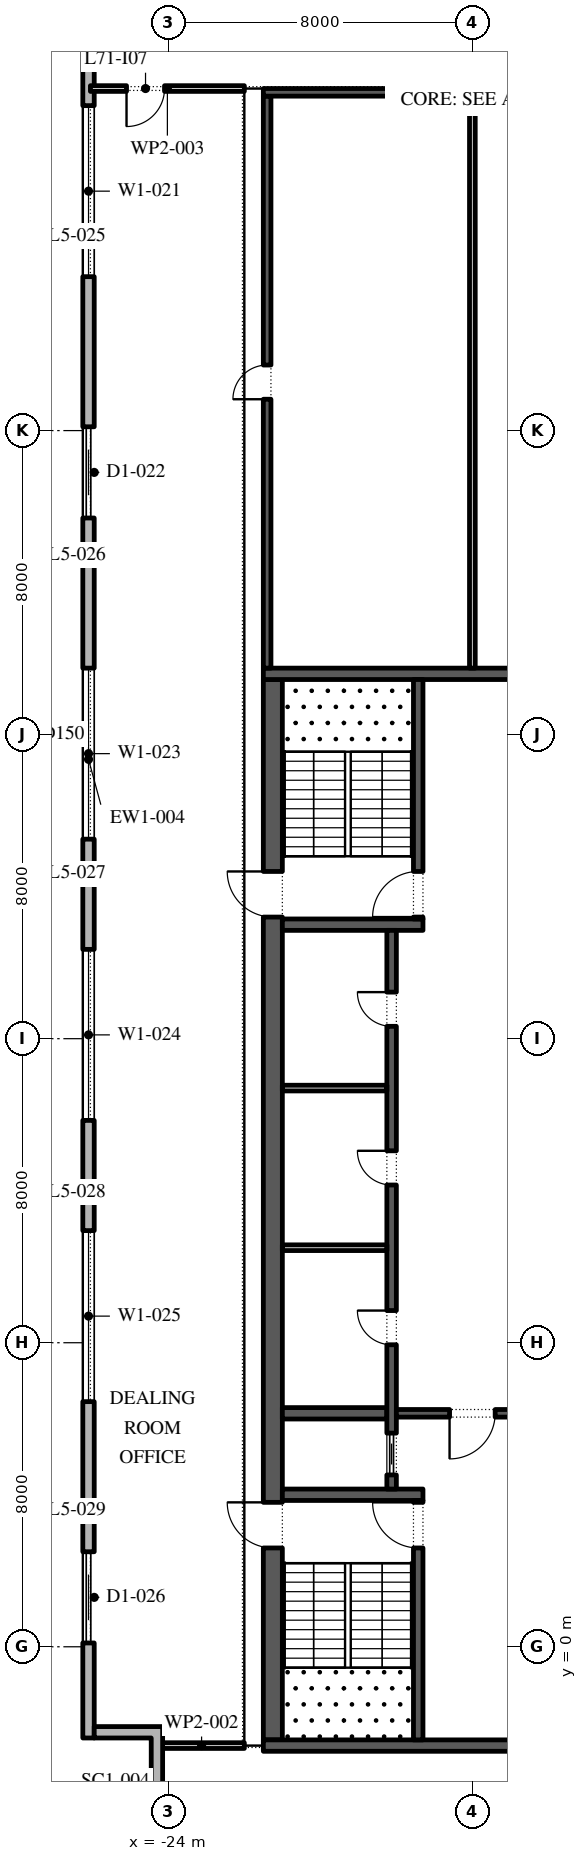
"""IFC4 building model, lengths in metres.
Left out: names, types, materials, properties, quantities, classifications, styles, units other than length and angle.
Written with IfcOpenShell. Run it as: python <this file> out.ifc"""

import sys

from ifc_helpers import new_model, si_unit, direction, frame, frame_2d, origin, place, context, subcontext, project, spatial, polyline, rectangle, outline, extrude, element, fill, save


model = new_model("IFC4")
c1 = context("Model", 3, precision=1e-05, world=origin(), true_north=direction((0.0, 1.0)))
c2 = subcontext(c1, "Body", "Model", "MODEL_VIEW")
j1 = project(units=[si_unit("LENGTHUNIT", "METRE"), si_unit("PLANEANGLEUNIT", "RADIAN")], contexts=[c1])
p1 = place(None, origin())
s1 = spatial("IfcSite", under=j1, at=p1, CompositionType="ELEMENT")
p2 = place(p1, origin())
s2 = spatial("IfcBuilding", under=s1, at=p2, CompositionType="ELEMENT")
p3 = place(p2, frame((0.0, 0.0, 325.8)))
s3 = spatial("IfcBuildingStorey", under=s2, at=p3, CompositionType="ELEMENT", Elevation=325.8)
p4 = place(p3, frame((-26.1, 49.1, 0.0), z_axis=(0.0, 0.0, 1.0), x_axis=(0.0, -1.0, 0.0)))
e1 = element("IfcWall", 1, at=p4, inside=s3, PredefinedType="STANDARD", context=c2, shape_type="SweptSolid", body=[
    extrude(rectangle(XDim=51.5, YDim=0.3, at=frame_2d((25.75, 0.0))), origin(), (0.0, 0.0, 1.0), 4.0),
])
p5 = place(p4, frame((1.3, 0.0, 0.45)))
e2 = element("IfcOpeningElement", 2, at=p5, cuts=e1, PredefinedType="OPENING", context=c2, shape_type="SweptSolid", body=[
    extrude(rectangle(XDim=4.5, YDim=3.05, at=frame_2d((2.25, 1.525))), frame((0.0, 0.16, 0.0), z_axis=(0.0, -1.0, 0.0), x_axis=(1.0, 0.0, 0.0)), (0.0, 0.0, 1.0), 0.32),
])
p6 = place(p4, frame((8.55, 0.0, 0.45)))
e3 = element("IfcOpeningElement", 3, at=p6, cuts=e1, PredefinedType="OPENING", context=c2, shape_type="SweptSolid", body=[
    extrude(rectangle(XDim=4.5, YDim=3.05, at=frame_2d((2.25, 1.525))), frame((0.0, 0.16, 0.0), z_axis=(0.0, -1.0, 0.0), x_axis=(1.0, 0.0, 0.0)), (0.0, 0.0, 1.0), 0.32),
])
p7 = place(p4, frame((17.0, 0.0, 0.0)))
e4 = element("IfcOpeningElement", 4, at=p7, cuts=e1, PredefinedType="OPENING", context=c2, shape_type="SweptSolid", body=[
    extrude(rectangle(XDim=2.4, YDim=3.5, at=frame_2d((1.2, 1.75))), frame((0.0, 0.16, 0.0), z_axis=(0.0, -1.0, 0.0), x_axis=(1.0, 0.0, 0.0)), (0.0, 0.0, 1.0), 0.32),
])
p8 = place(p4, frame((23.35, 0.0, 0.45)))
e5 = element("IfcOpeningElement", 5, at=p8, cuts=e1, PredefinedType="OPENING", context=c2, shape_type="SweptSolid", body=[
    extrude(rectangle(XDim=4.5, YDim=3.05, at=frame_2d((2.25, 1.525))), frame((0.0, 0.16, 0.0), z_axis=(0.0, -1.0, 0.0), x_axis=(1.0, 0.0, 0.0)), (0.0, 0.0, 1.0), 0.32),
])
p9 = place(p4, frame((30.75, 0.0, 0.45)))
e6 = element("IfcOpeningElement", 6, at=p9, cuts=e1, PredefinedType="OPENING", context=c2, shape_type="SweptSolid", body=[
    extrude(rectangle(XDim=4.5, YDim=3.05, at=frame_2d((2.25, 1.525))), frame((0.0, 0.16, 0.0), z_axis=(0.0, -1.0, 0.0), x_axis=(1.0, 0.0, 0.0)), (0.0, 0.0, 1.0), 0.32),
])
p10 = place(p4, frame((38.15, 0.0, 0.45)))
e7 = element("IfcOpeningElement", 7, at=p10, cuts=e1, PredefinedType="OPENING", context=c2, shape_type="SweptSolid", body=[
    extrude(rectangle(XDim=4.5, YDim=3.05, at=frame_2d((2.25, 1.525))), frame((0.0, 0.16, 0.0), z_axis=(0.0, -1.0, 0.0), x_axis=(1.0, 0.0, 0.0)), (0.0, 0.0, 1.0), 0.32),
])
p11 = place(p4, frame((46.6, 0.0, 0.0)))
e8 = element("IfcOpeningElement", 8, at=p11, cuts=e1, PredefinedType="OPENING", context=c2, shape_type="SweptSolid", body=[
    extrude(rectangle(XDim=2.4, YDim=3.5, at=frame_2d((1.2, 1.75))), frame((0.0, 0.16, 0.0), z_axis=(0.0, -1.0, 0.0), x_axis=(1.0, 0.0, 0.0)), (0.0, 0.0, 1.0), 0.32),
])
p12 = place(p3, origin())
e9 = element("IfcWall", 9, at=p12, inside=s3, PredefinedType="STANDARD", context=c2, shape_type="SweptSolid", body=[
    extrude(outline(polyline([(-22.65, -4.2), (-24.45, -4.2), (-24.45, -2.4), (-25.95, -2.4), (-25.95, -2.1), (-24.15, -2.1), (-24.15, -3.9), (-22.35, -3.9), (-22.35, -6.0), (-22.65, -6.0), (-22.65, -4.2)])), origin(), (0.0, 0.0, 1.0), 4.0),
])
p13 = place(p3, frame((-21.25, -2.45, 0.0), z_axis=(0.0, 0.0, 1.0), x_axis=(0.0, 1.0, 0.0)))
e10 = element("IfcWall", 10, at=p13, inside=s3, PredefinedType="SHEAR", context=c2, shape_type="SweptSolid", body=[
    extrude(rectangle(XDim=27.9, YDim=0.5, at=frame_2d((13.95, 0.0))), origin(), (0.0, 0.0, 1.0), 4.0),
])
p14 = place(p13, frame((5.05, 0.0, 0.0)))
e11 = element("IfcOpeningElement", 11, at=p14, cuts=e10, PredefinedType="OPENING", context=c2, shape_type="SweptSolid", body=[
    extrude(rectangle(XDim=1.2, YDim=2.1, at=frame_2d((0.6, 1.05))), frame((0.0, 0.26, 0.0), z_axis=(0.0, -1.0, 0.0), x_axis=(1.0, 0.0, 0.0)), (0.0, 0.0, 1.0), 0.52),
])
p15 = place(p13, frame((21.65, 0.0, 0.0)))
e12 = element("IfcOpeningElement", 12, at=p15, cuts=e10, PredefinedType="OPENING", context=c2, shape_type="SweptSolid", body=[
    extrude(rectangle(XDim=1.2, YDim=2.1, at=frame_2d((0.6, 1.05))), frame((0.0, 0.26, 0.0), z_axis=(0.0, -1.0, 0.0), x_axis=(1.0, 0.0, 0.0)), (0.0, 0.0, 1.0), 0.52),
])
for number, where, z_axis, x_axis in (
    (13, (-21.5, -2.6, 0.0), (0.0, 0.0, 1.0), (1.0, 0.0, 0.0)),
    (14, (-21.5, 25.6, 0.0), (0.0, 0.0, 1.0), (1.0, 0.0, 0.0)),
):
    element("IfcWall", number, at=place(p3, frame(where, z_axis=z_axis, x_axis=x_axis)), inside=s3, PredefinedType="SHEAR", context=c2, shape_type="SweptSolid", body=[
        extrude(rectangle(XDim=11.0, YDim=0.3, at=frame_2d((5.5, 0.0))), origin(), (0.0, 0.0, 1.0), 4.0),
    ])
p16 = place(p3, frame((-21.0, 4.0, 0.0), z_axis=(0.0, 0.0, 1.0), x_axis=(1.0, 0.0, 0.0)))
e15 = element("IfcWall", 15, at=p16, inside=s3, PredefinedType="SHEAR", context=c2, shape_type="SweptSolid", body=[
    extrude(rectangle(XDim=3.7, YDim=0.3, at=frame_2d((1.85, 0.0))), origin(), (0.0, 0.0, 1.0), 4.0),
])
p17 = place(p3, frame((-17.425, -2.45, 0.0), z_axis=(0.0, 0.0, 1.0), x_axis=(0.0, 1.0, 0.0)))
e16 = element("IfcWall", 16, at=p17, inside=s3, PredefinedType="SHEAR", context=c2, shape_type="SweptSolid", body=[
    extrude(rectangle(XDim=6.3, YDim=0.25, at=frame_2d((3.15, 0.0))), origin(), (0.0, 0.0, 1.0), 4.0),
])
p18 = place(p17, frame((5.05, 0.0, 0.0)))
e17 = element("IfcOpeningElement", 17, at=p18, cuts=e16, PredefinedType="OPENING", context=c2, shape_type="SweptSolid", body=[
    extrude(rectangle(XDim=1.2, YDim=2.1, at=frame_2d((0.6, 1.05))), frame((0.0, 0.135, 0.0), z_axis=(0.0, -1.0, 0.0), x_axis=(1.0, 0.0, 0.0)), (0.0, 0.0, 1.0), 0.27),
])
p19 = place(p3, frame((-21.0, 19.0, 0.0), z_axis=(0.0, 0.0, 1.0), x_axis=(1.0, 0.0, 0.0)))
e18 = element("IfcWall", 18, at=p19, inside=s3, PredefinedType="SHEAR", context=c2, shape_type="SweptSolid", body=[
    extrude(rectangle(XDim=3.7, YDim=0.3, at=frame_2d((1.85, 0.0))), origin(), (0.0, 0.0, 1.0), 4.0),
])
p20 = place(p3, frame((-17.425, 19.15, 0.0), z_axis=(0.0, 0.0, 1.0), x_axis=(0.0, 1.0, 0.0)))
e19 = element("IfcWall", 19, at=p20, inside=s3, PredefinedType="SHEAR", context=c2, shape_type="SweptSolid", body=[
    extrude(rectangle(XDim=6.3, YDim=0.25, at=frame_2d((3.15, 0.0))), origin(), (0.0, 0.0, 1.0), 4.0),
])
p21 = place(p20, frame((0.05, 0.0, 0.0)))
e20 = element("IfcOpeningElement", 20, at=p21, cuts=e19, PredefinedType="OPENING", context=c2, shape_type="SweptSolid", body=[
    extrude(rectangle(XDim=1.2, YDim=2.1, at=frame_2d((0.6, 1.05))), frame((0.0, 0.135, 0.0), z_axis=(0.0, -1.0, 0.0), x_axis=(1.0, 0.0, 0.0)), (0.0, 0.0, 1.0), 0.27),
])
p22 = place(p3, frame((-21.0, 6.143, 0.0), z_axis=(0.0, 0.0, 1.0), x_axis=(1.0, 0.0, 0.0)))
e21 = element("IfcWall", 21, at=p22, inside=s3, PredefinedType="SHEAR", context=c2, shape_type="SweptSolid", body=[
    extrude(rectangle(XDim=2.75, YDim=0.3, at=frame_2d((1.375, 0.0))), origin(), (0.0, 0.0, 1.0), 4.0),
])
p23 = place(p3, frame((-18.125, 4.15, 0.0), z_axis=(0.0, 0.0, 1.0), x_axis=(0.0, 1.0, 0.0)))
e22 = element("IfcWall", 22, at=p23, inside=s3, PredefinedType="SHEAR", context=c2, shape_type="SweptSolid", body=[
    extrude(rectangle(XDim=14.7, YDim=0.25, at=frame_2d((7.35, 0.0))), origin(), (0.0, 0.0, 1.0), 4.0),
])
p24 = place(p23, frame((3.796, 0.0, 0.0)))
e23 = element("IfcOpeningElement", 23, at=p24, cuts=e22, PredefinedType="OPENING", context=c2, shape_type="SweptSolid", body=[
    extrude(rectangle(XDim=0.9, YDim=2.1, at=frame_2d((0.45, 1.05))), frame((0.0, 0.135, 0.0), z_axis=(0.0, -1.0, 0.0), x_axis=(1.0, 0.0, 0.0)), (0.0, 0.0, 1.0), 0.27),
])
p25 = place(p23, frame((8.0, 0.0, 0.0)))
e24 = element("IfcOpeningElement", 24, at=p25, cuts=e22, PredefinedType="OPENING", context=c2, shape_type="SweptSolid", body=[
    extrude(rectangle(XDim=0.9, YDim=2.1, at=frame_2d((0.45, 1.05))), frame((0.0, 0.135, 0.0), z_axis=(0.0, -1.0, 0.0), x_axis=(1.0, 0.0, 0.0)), (0.0, 0.0, 1.0), 0.27),
])
p26 = place(p23, frame((12.175, 0.0, 0.0)))
e25 = element("IfcOpeningElement", 25, at=p26, cuts=e22, PredefinedType="OPENING", context=c2, shape_type="SweptSolid", body=[
    extrude(rectangle(XDim=0.9, YDim=2.1, at=frame_2d((0.45, 1.05))), frame((0.0, 0.135, 0.0), z_axis=(0.0, -1.0, 0.0), x_axis=(1.0, 0.0, 0.0)), (0.0, 0.0, 1.0), 0.27),
])
p27 = place(p23, frame((0.371, 0.0, 0.0)))
e26 = element("IfcOpeningElement", 26, at=p27, cuts=e22, PredefinedType="OPENING", context=c2, shape_type="SweptSolid", body=[
    extrude(rectangle(XDim=1.1, YDim=2.1, at=frame_2d((0.55, 1.05))), frame((0.0, 0.135, 0.0), z_axis=(0.0, -1.0, 0.0), x_axis=(1.0, 0.0, 0.0)), (0.0, 0.0, 1.0), 0.27),
])
for number, where, z_axis, x_axis in (
    (27, (-21.0, 10.5, 0.0), (0.0, 0.0, 1.0), (1.0, 0.0, 0.0)),
    (28, (-21.0, 14.7, 0.0), (0.0, 0.0, 1.0), (1.0, 0.0, 0.0)),
):
    element("IfcWall", number, at=place(p3, frame(where, z_axis=z_axis, x_axis=x_axis)), inside=s3, PredefinedType="PARTITIONING", context=c2, shape_type="SweptSolid", body=[
        extrude(rectangle(XDim=2.75, YDim=0.15, at=frame_2d((1.375, 0.0))), origin(), (0.0, 0.0, 1.0), 4.0),
    ])
p28 = place(p3, frame((-18.0, 6.143, 0.0), z_axis=(0.0, 0.0, 1.0), x_axis=(1.0, 0.0, 0.0)))
e29 = element("IfcWall", 29, at=p28, inside=s3, PredefinedType="SHEAR", context=c2, shape_type="SweptSolid", body=[
    extrude(rectangle(XDim=4.0, YDim=0.2, at=frame_2d((2.0, 0.0))), origin(), (0.0, 0.0, 1.0), 4.0),
])
p29 = place(p28, frame((1.4, 0.0, 0.0)))
e30 = element("IfcOpeningElement", 30, at=p29, cuts=e29, PredefinedType="OPENING", context=c2, shape_type="SweptSolid", body=[
    extrude(rectangle(XDim=1.2, YDim=2.1, at=frame_2d((0.6, 1.05))), frame((0.0, 0.11, 0.0), z_axis=(0.0, -1.0, 0.0), x_axis=(1.0, 0.0, 0.0)), (0.0, 0.0, 1.0), 0.22),
])
p30 = place(p3, frame((-21.4, 25.75, 0.0), z_axis=(0.0, 0.0, 1.0), x_axis=(0.0, 1.0, 0.0)))
e31 = element("IfcWall", 31, at=p30, inside=s3, PredefinedType="SHEAR", context=c2, shape_type="SweptSolid", body=[
    extrude(rectangle(XDim=15.05, YDim=0.2, at=frame_2d((7.525, 0.0))), origin(), (0.0, 0.0, 1.0), 4.0),
])
p31 = place(p30, frame((7.075, 0.0, 0.0)))
e32 = element("IfcOpeningElement", 32, at=p31, cuts=e31, PredefinedType="OPENING", context=c2, shape_type="SweptSolid", body=[
    extrude(rectangle(XDim=0.9, YDim=2.1, at=frame_2d((0.45, 1.05))), frame((0.0, 0.11, 0.0), z_axis=(0.0, -1.0, 0.0), x_axis=(1.0, 0.0, 0.0)), (0.0, 0.0, 1.0), 0.22),
])
p32 = place(p3, frame((-21.5, 40.9, 0.0), z_axis=(0.0, 0.0, 1.0), x_axis=(1.0, 0.0, 0.0)))
e33 = element("IfcWall", 33, at=p32, inside=s3, PredefinedType="SHEAR", context=c2, shape_type="SweptSolid", body=[
    extrude(rectangle(XDim=11.0, YDim=0.2, at=frame_2d((5.5, 0.0))), origin(), (0.0, 0.0, 1.0), 4.0),
])
p33 = place(p3, frame((-16.0, 25.75, 0.0), z_axis=(0.0, 0.0, 1.0), x_axis=(0.0, 1.0, 0.0)))
e34 = element("IfcWall", 34, at=p33, inside=s3, PredefinedType="PARTITIONING", context=c2, shape_type="SweptSolid", body=[
    extrude(rectangle(XDim=15.05, YDim=0.15, at=frame_2d((7.525, 0.0))), origin(), (0.0, 0.0, 1.0), 4.0),
])
p34 = place(p3, frame((-24.25, -2.6, 0.0), z_axis=(0.0, 0.0, 1.0), x_axis=(1.0, 0.0, 0.0)))
e35 = element("IfcWall", 35, at=p34, inside=s3, PredefinedType="PARTITIONING", context=c2, shape_type="SweptSolid", body=[
    extrude(rectangle(XDim=2.25, YDim=0.15, at=frame_2d((1.125, 0.0))), origin(), (0.0, 0.0, 1.0), 4.0),
])
p35 = place(p3, frame((-22.0, 41.0, 0.0), z_axis=(0.0, 0.0, 1.0), x_axis=(-1.0, 0.0, 0.0)))
e36 = element("IfcWall", 36, at=p35, inside=s3, PredefinedType="PARTITIONING", context=c2, shape_type="SweptSolid", body=[
    extrude(rectangle(XDim=4.05, YDim=0.15, at=frame_2d((2.025, 0.0))), origin(), (0.0, 0.0, 1.0), 4.0),
])
p36 = place(p35, frame((2.1, 0.0, 0.0)))
e37 = element("IfcOpeningElement", 37, at=p36, cuts=e36, PredefinedType="OPENING", context=c2, shape_type="SweptSolid", body=[
    extrude(rectangle(XDim=1.0, YDim=2.1, at=frame_2d((0.5, 1.05))), frame((0.0, 0.085, 0.0), z_axis=(0.0, -1.0, 0.0), x_axis=(1.0, 0.0, 0.0)), (0.0, 0.0, 1.0), 0.17),
])
p37 = place(p6, origin())
e38 = element("IfcWindow", 38, at=p37, inside=s3, PartitioningType="DOUBLE_PANEL_VERTICAL", PredefinedType="WINDOW", context=c2, shape_type="SweptSolid", body=[
    extrude(rectangle(XDim=4.5, YDim=3.05, at=frame_2d((2.25, 1.525))), frame((0.0, 0.03, 0.0), z_axis=(0.0, -1.0, 0.0), x_axis=(1.0, 0.0, 0.0)), (0.0, 0.0, 1.0), 0.06),
])
fill(e3, e38)
p38 = place(p7, origin())
e39 = element("IfcDoor", 39, at=p38, inside=s3, OperationType="DOUBLE_DOOR_SLIDING", PredefinedType="DOOR", context=c2, shape_type="SweptSolid", body=[
    extrude(rectangle(XDim=2.4, YDim=3.5, at=frame_2d((1.2, 1.75))), frame((0.0, 0.025, 0.0), z_axis=(0.0, -1.0, 0.0), x_axis=(1.0, 0.0, 0.0)), (0.0, 0.0, 1.0), 0.05),
])
fill(e4, e39)
p39 = place(p8, origin())
e40 = element("IfcWindow", 40, at=p39, inside=s3, PartitioningType="DOUBLE_PANEL_VERTICAL", PredefinedType="WINDOW", context=c2, shape_type="SweptSolid", body=[
    extrude(rectangle(XDim=4.5, YDim=3.05, at=frame_2d((2.25, 1.525))), frame((0.0, 0.03, 0.0), z_axis=(0.0, -1.0, 0.0), x_axis=(1.0, 0.0, 0.0)), (0.0, 0.0, 1.0), 0.06),
])
fill(e5, e40)
p40 = place(p9, origin())
e41 = element("IfcWindow", 41, at=p40, inside=s3, PartitioningType="DOUBLE_PANEL_VERTICAL", PredefinedType="WINDOW", context=c2, shape_type="SweptSolid", body=[
    extrude(rectangle(XDim=4.5, YDim=3.05, at=frame_2d((2.25, 1.525))), frame((0.0, 0.03, 0.0), z_axis=(0.0, -1.0, 0.0), x_axis=(1.0, 0.0, 0.0)), (0.0, 0.0, 1.0), 0.06),
])
fill(e6, e41)
p41 = place(p10, origin())
e42 = element("IfcWindow", 42, at=p41, inside=s3, PartitioningType="DOUBLE_PANEL_VERTICAL", PredefinedType="WINDOW", context=c2, shape_type="SweptSolid", body=[
    extrude(rectangle(XDim=4.5, YDim=3.05, at=frame_2d((2.25, 1.525))), frame((0.0, 0.03, 0.0), z_axis=(0.0, -1.0, 0.0), x_axis=(1.0, 0.0, 0.0)), (0.0, 0.0, 1.0), 0.06),
])
fill(e7, e42)
p42 = place(p11, origin())
e43 = element("IfcDoor", 43, at=p42, inside=s3, OperationType="DOUBLE_DOOR_SLIDING", PredefinedType="DOOR", context=c2, shape_type="SweptSolid", body=[
    extrude(rectangle(XDim=2.4, YDim=3.5, at=frame_2d((1.2, 1.75))), frame((0.0, 0.025, 0.0), z_axis=(0.0, -1.0, 0.0), x_axis=(1.0, 0.0, 0.0)), (0.0, 0.0, 1.0), 0.05),
])
fill(e8, e43)
p43 = place(p24, origin())
e44 = element("IfcDoor", 44, at=p43, inside=s3, OperationType="SINGLE_SWING_LEFT", PredefinedType="DOOR", context=c2, shape_type="SweptSolid", body=[
    extrude(rectangle(XDim=0.9, YDim=2.1, at=frame_2d((0.45, 1.05))), frame((0.0, 0.125, 0.0), z_axis=(0.0, -1.0, 0.0), x_axis=(1.0, 0.0, 0.0)), (0.0, 0.0, 1.0), 0.05),
])
fill(e23, e44)
p44 = place(p25, origin())
e45 = element("IfcDoor", 45, at=p44, inside=s3, OperationType="SINGLE_SWING_LEFT", PredefinedType="DOOR", context=c2, shape_type="SweptSolid", body=[
    extrude(rectangle(XDim=0.9, YDim=2.1, at=frame_2d((0.45, 1.05))), frame((0.0, 0.125, 0.0), z_axis=(0.0, -1.0, 0.0), x_axis=(1.0, 0.0, 0.0)), (0.0, 0.0, 1.0), 0.05),
])
fill(e24, e45)
p45 = place(p26, origin())
e46 = element("IfcDoor", 46, at=p45, inside=s3, OperationType="SINGLE_SWING_LEFT", PredefinedType="DOOR", context=c2, shape_type="SweptSolid", body=[
    extrude(rectangle(XDim=0.9, YDim=2.1, at=frame_2d((0.45, 1.05))), frame((0.0, 0.125, 0.0), z_axis=(0.0, -1.0, 0.0), x_axis=(1.0, 0.0, 0.0)), (0.0, 0.0, 1.0), 0.05),
])
fill(e25, e46)
p46 = place(p27, origin())
e47 = element("IfcDoor", 47, at=p46, inside=s3, OperationType="SLIDING_TO_LEFT", PredefinedType="DOOR", context=c2, shape_type="SweptSolid", body=[
    extrude(rectangle(XDim=1.1, YDim=2.1, at=frame_2d((0.55, 1.05))), frame((0.0, 0.025, 0.0), z_axis=(0.0, -1.0, 0.0), x_axis=(1.0, 0.0, 0.0)), (0.0, 0.0, 1.0), 0.05),
])
fill(e26, e47)
p47 = place(p29, frame((1.2, 0.0, 0.0), z_axis=(0.0, 0.0, 1.0), x_axis=(-1.0, 0.0, 0.0)))
e48 = element("IfcDoor", 48, at=p47, inside=s3, OperationType="SINGLE_SWING_LEFT", PredefinedType="DOOR", context=c2, shape_type="SweptSolid", body=[
    extrude(rectangle(XDim=1.2, YDim=2.1, at=frame_2d((0.6, 1.05))), frame((0.0, 0.025, 0.0), z_axis=(0.0, -1.0, 0.0), x_axis=(1.0, 0.0, 0.0)), (0.0, 0.0, 1.0), 0.05),
])
fill(e30, e48)
p48 = place(p18, origin())
e49 = element("IfcDoor", 49, at=p48, inside=s3, OperationType="SINGLE_SWING_LEFT", PredefinedType="DOOR", context=c2, shape_type="SweptSolid", body=[
    extrude(rectangle(XDim=1.2, YDim=2.1, at=frame_2d((0.6, 1.05))), frame((0.0, 0.025, 0.0), z_axis=(0.0, -1.0, 0.0), x_axis=(1.0, 0.0, 0.0)), (0.0, 0.0, 1.0), 0.05),
])
fill(e17, e49)
p49 = place(p14, origin())
e50 = element("IfcDoor", 50, at=p49, inside=s3, OperationType="SINGLE_SWING_LEFT", PredefinedType="DOOR", context=c2, shape_type="SweptSolid", body=[
    extrude(rectangle(XDim=1.2, YDim=2.1, at=frame_2d((0.6, 1.05))), frame((0.0, 0.025, 0.0), z_axis=(0.0, -1.0, 0.0), x_axis=(1.0, 0.0, 0.0)), (0.0, 0.0, 1.0), 0.05),
])
fill(e11, e50)
p50 = place(p21, origin())
e51 = element("IfcDoor", 51, at=p50, inside=s3, OperationType="SINGLE_SWING_RIGHT", PredefinedType="DOOR", context=c2, shape_type="SweptSolid", body=[
    extrude(rectangle(XDim=1.2, YDim=2.1, at=frame_2d((0.6, 1.05))), frame((0.0, 0.025, 0.0), z_axis=(0.0, -1.0, 0.0), x_axis=(1.0, 0.0, 0.0)), (0.0, 0.0, 1.0), 0.05),
])
fill(e20, e51)
p51 = place(p15, origin())
e52 = element("IfcDoor", 52, at=p51, inside=s3, OperationType="SINGLE_SWING_LEFT", PredefinedType="DOOR", context=c2, shape_type="SweptSolid", body=[
    extrude(rectangle(XDim=1.2, YDim=2.1, at=frame_2d((0.6, 1.05))), frame((0.0, 0.025, 0.0), z_axis=(0.0, -1.0, 0.0), x_axis=(1.0, 0.0, 0.0)), (0.0, 0.0, 1.0), 0.05),
])
fill(e12, e52)
p52 = place(p31, origin())
e53 = element("IfcDoor", 53, at=p52, inside=s3, OperationType="SINGLE_SWING_RIGHT", PredefinedType="DOOR", context=c2, shape_type="SweptSolid", body=[
    extrude(rectangle(XDim=0.9, YDim=2.1, at=frame_2d((0.45, 1.05))), frame((0.0, -0.05, 0.0), z_axis=(0.0, -1.0, 0.0), x_axis=(1.0, 0.0, 0.0)), (0.0, 0.0, 1.0), 0.05),
])
fill(e32, e53)
p53 = place(p36, origin())
e54 = element("IfcDoor", 54, at=p53, inside=s3, OperationType="SINGLE_SWING_LEFT", PredefinedType="DOOR", context=c2, shape_type="SweptSolid", body=[
    extrude(rectangle(XDim=1.0, YDim=2.1, at=frame_2d((0.5, 1.05))), frame((0.0, 0.025, 0.0), z_axis=(0.0, -1.0, 0.0), x_axis=(1.0, 0.0, 0.0)), (0.0, 0.0, 1.0), 0.05),
])
fill(e37, e54)
save(model, sys.argv[1])
